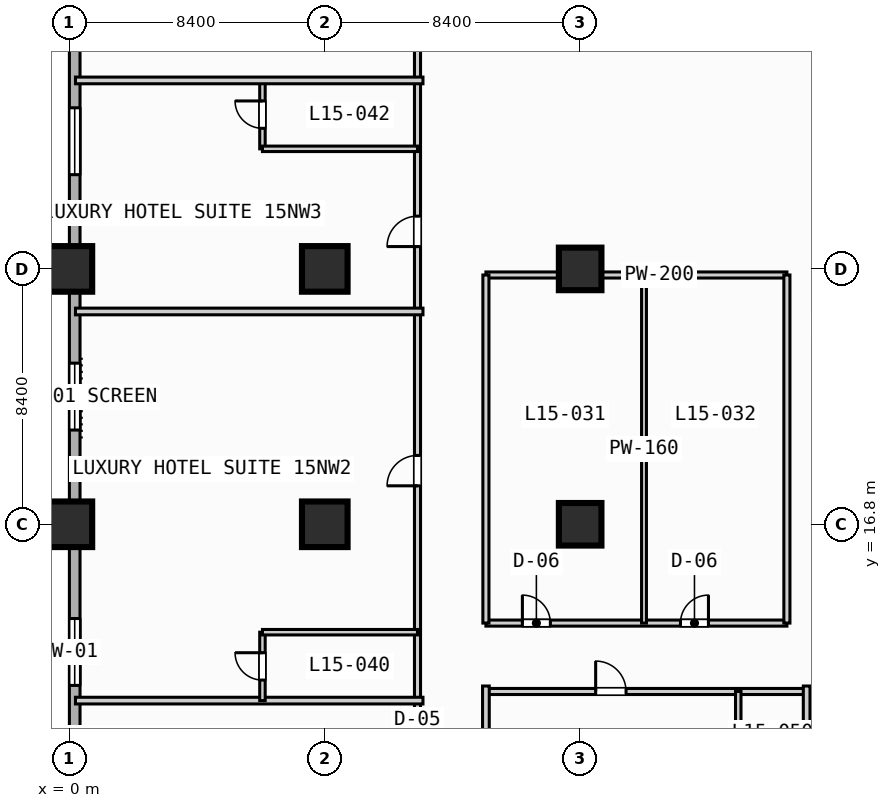
"""IFC4 building model, lengths in metres.
Left out: names, types, materials, properties, quantities, classifications, styles, units other than length and angle.
Written with IfcOpenShell. Run it as: python <this file> out.ifc"""

import sys

from ifc_helpers import new_model, si_unit, direction, frame, frame_2d, origin, origin_2d, place, context, subcontext, project, spatial, rectangle, extrude, element, fill, save


model = new_model("IFC4")
c1 = context("Model", 3, precision=1e-05, world=origin(), true_north=direction((0.0, 1.0)))
c2 = subcontext(c1, "Body", "Model", "MODEL_VIEW")
j1 = project(units=[si_unit("LENGTHUNIT", "METRE"), si_unit("PLANEANGLEUNIT", "RADIAN")], contexts=[c1])
p1 = place(None, origin())
s1 = spatial("IfcSite", under=j1, at=p1, CompositionType="ELEMENT")
p2 = place(p1, origin())
s2 = spatial("IfcBuilding", under=s1, at=p2, CompositionType="ELEMENT")
p3 = place(p2, frame((0.0, 0.0, 66.2)))
s3 = spatial("IfcBuildingStorey", under=s2, at=p3, CompositionType="ELEMENT", Elevation=66.2)
for number, where, z_axis, x_axis in (
    (1, (0.0, 16.8, 0.0), (0.0, 0.0, 1.0), (1.0, 0.0, 0.0)),
    (2, (0.0, 25.2, 0.0), (0.0, 0.0, 1.0), (1.0, 0.0, 0.0)),
    (3, (8.4, 16.8, 0.0), (0.0, 0.0, 1.0), (1.0, 0.0, 0.0)),
    (4, (8.4, 25.2, 0.0), (0.0, 0.0, 1.0), (1.0, 0.0, 0.0)),
):
    element("IfcColumn", number, at=place(p3, frame(where, z_axis=z_axis, x_axis=x_axis)), inside=s3, PredefinedType="COLUMN", context=c2, shape_type="SweptSolid", body=[
        extrude(rectangle(XDim=1.5, YDim=1.5, at=origin_2d()), origin(), (0.0, 0.0, 1.0), 3.8),
    ])
for number, where, z_axis, x_axis in (
    (5, (16.8, 16.8, 0.0), (0.0, 0.0, 1.0), (1.0, 0.0, 0.0)),
    (6, (16.8, 25.2, 0.0), (0.0, 0.0, 1.0), (1.0, 0.0, 0.0)),
):
    element("IfcColumn", number, at=place(p3, frame(where, z_axis=z_axis, x_axis=x_axis)), inside=s3, PredefinedType="COLUMN", context=c2, shape_type="SweptSolid", body=[
        extrude(rectangle(XDim=1.4, YDim=1.4, at=origin_2d()), origin(), (0.0, 0.0, 1.0), 3.8),
    ])
p4 = place(p3, frame((0.175, 3.175, 0.0), z_axis=(0.0, 0.0, 1.0), x_axis=(0.0, 1.0, 0.0)))
e7 = element("IfcWall", 7, at=p4, inside=s3, PredefinedType="STANDARD", context=c2, shape_type="SweptSolid", body=[
    extrude(rectangle(XDim=86.05, YDim=0.35, at=frame_2d((43.025, 0.0))), origin(), (0.0, 0.0, 1.0), 3.55),
])
p5 = place(p4, frame((42.325, 0.0, 0.0)))
e8 = element("IfcOpeningElement", 8, at=p5, cuts=e7, PredefinedType="OPENING", context=c2, shape_type="SweptSolid", body=[
    extrude(rectangle(XDim=1.4, YDim=2.2, at=frame_2d((0.7, 1.1))), frame((0.0, 0.185, 0.0), z_axis=(0.0, -1.0, 0.0), x_axis=(1.0, 0.0, 0.0)), (0.0, 0.0, 1.0), 0.37),
])
p6 = place(p4, frame((8.325, 0.0, 0.85)))
e9 = element("IfcOpeningElement", 9, at=p6, cuts=e7, PredefinedType="OPENING", context=c2, shape_type="SweptSolid", body=[
    extrude(rectangle(XDim=2.2, YDim=1.8, at=frame_2d((1.1, 0.9))), frame((0.0, 0.185, 0.0), z_axis=(0.0, -1.0, 0.0), x_axis=(1.0, 0.0, 0.0)), (0.0, 0.0, 1.0), 0.37),
])
p7 = place(p4, frame((16.725, 0.0, 0.85)))
e10 = element("IfcOpeningElement", 10, at=p7, cuts=e7, PredefinedType="OPENING", context=c2, shape_type="SweptSolid", body=[
    extrude(rectangle(XDim=2.2, YDim=1.8, at=frame_2d((1.1, 0.9))), frame((0.0, 0.185, 0.0), z_axis=(0.0, -1.0, 0.0), x_axis=(1.0, 0.0, 0.0)), (0.0, 0.0, 1.0), 0.37),
])
p8 = place(p4, frame((25.125, 0.0, 0.85)))
e11 = element("IfcOpeningElement", 11, at=p8, cuts=e7, PredefinedType="OPENING", context=c2, shape_type="SweptSolid", body=[
    extrude(rectangle(XDim=2.2, YDim=1.8, at=frame_2d((1.1, 0.9))), frame((0.0, 0.185, 0.0), z_axis=(0.0, -1.0, 0.0), x_axis=(1.0, 0.0, 0.0)), (0.0, 0.0, 1.0), 0.37),
])
p9 = place(p4, frame((33.525, 0.0, 0.85)))
e12 = element("IfcOpeningElement", 12, at=p9, cuts=e7, PredefinedType="OPENING", context=c2, shape_type="SweptSolid", body=[
    extrude(rectangle(XDim=2.2, YDim=1.8, at=frame_2d((1.1, 0.9))), frame((0.0, 0.185, 0.0), z_axis=(0.0, -1.0, 0.0), x_axis=(1.0, 0.0, 0.0)), (0.0, 0.0, 1.0), 0.37),
])
p10 = place(p4, frame((2.375, 0.0, 0.85)))
e13 = element("IfcOpeningElement", 13, at=p10, cuts=e7, PredefinedType="OPENING", context=c2, shape_type="SweptSolid", body=[
    extrude(rectangle(XDim=1.8, YDim=1.8, at=frame_2d((0.9, 0.9))), frame((0.0, 0.185, 0.0), z_axis=(0.0, -1.0, 0.0), x_axis=(1.0, 0.0, 0.0)), (0.0, 0.0, 1.0), 0.37),
])
p11 = place(p4, frame((56.475, 0.0, 0.85)))
e14 = element("IfcOpeningElement", 14, at=p11, cuts=e7, PredefinedType="OPENING", context=c2, shape_type="SweptSolid", body=[
    extrude(rectangle(XDim=1.8, YDim=1.8, at=frame_2d((0.9, 0.9))), frame((0.0, 0.185, 0.0), z_axis=(0.0, -1.0, 0.0), x_axis=(1.0, 0.0, 0.0)), (0.0, 0.0, 1.0), 0.37),
])
p12 = place(p3, frame((13.7, 13.55, 0.0), z_axis=(0.0, 0.0, 1.0), x_axis=(1.0, 0.0, 0.0)))
e15 = element("IfcWall", 15, at=p12, inside=s3, PredefinedType="PARTITIONING", context=c2, shape_type="SweptSolid", body=[
    extrude(rectangle(XDim=9.9, YDim=0.2, at=frame_2d((4.95, 0.0))), origin(), (0.0, 0.0, 1.0), 3.55),
])
p13 = place(p12, frame((1.2, 0.0, 0.0)))
e16 = element("IfcOpeningElement", 16, at=p13, cuts=e15, PredefinedType="OPENING", context=c2, shape_type="SweptSolid", body=[
    extrude(rectangle(XDim=0.92, YDim=2.1, at=frame_2d((0.46, 1.05))), frame((0.0, 0.11, 0.0), z_axis=(0.0, -1.0, 0.0), x_axis=(1.0, 0.0, 0.0)), (0.0, 0.0, 1.0), 0.22),
])
p14 = place(p12, frame((6.4, 0.0, 0.0)))
e17 = element("IfcOpeningElement", 17, at=p14, cuts=e15, PredefinedType="OPENING", context=c2, shape_type="SweptSolid", body=[
    extrude(rectangle(XDim=0.92, YDim=2.1, at=frame_2d((0.46, 1.05))), frame((0.0, 0.11, 0.0), z_axis=(0.0, -1.0, 0.0), x_axis=(1.0, 0.0, 0.0)), (0.0, 0.0, 1.0), 0.22),
])
p15 = place(p3, frame((18.9, 13.55, 0.0), z_axis=(0.0, 0.0, 1.0), x_axis=(0.0, 1.0, 0.0)))
e18 = element("IfcWall", 18, at=p15, inside=s3, PredefinedType="PARTITIONING", context=c2, shape_type="SweptSolid", body=[
    extrude(rectangle(XDim=11.45, YDim=0.16, at=frame_2d((5.725, 0.0))), origin(), (0.0, 0.0, 1.0), 3.55),
])
p16 = place(p3, frame((13.7, 25.0, 0.0), z_axis=(0.0, 0.0, 1.0), x_axis=(1.0, 0.0, 0.0)))
e19 = element("IfcWall", 19, at=p16, inside=s3, PredefinedType="PARTITIONING", context=c2, shape_type="SweptSolid", body=[
    extrude(rectangle(XDim=9.9, YDim=0.2, at=frame_2d((4.95, 0.0))), origin(), (0.0, 0.0, 1.0), 2.8),
])
for number, where, z_axis, x_axis in (
    (20, (13.7, 13.55, 0.0), (0.0, 0.0, 1.0), (0.0, 1.0, 0.0)),
    (21, (23.6, 13.55, 0.0), (0.0, 0.0, 1.0), (0.0, 1.0, 0.0)),
):
    element("IfcWall", number, at=place(p3, frame(where, z_axis=z_axis, x_axis=x_axis)), inside=s3, PredefinedType="PARTITIONING", context=c2, shape_type="SweptSolid", body=[
        extrude(rectangle(XDim=11.45, YDim=0.2, at=frame_2d((5.725, 0.0))), origin(), (0.0, 0.0, 1.0), 3.55),
    ])
p17 = place(p3, frame((11.45, 3.4, 0.0), z_axis=(0.0, 0.0, 1.0), x_axis=(0.0, 1.0, 0.0)))
e22 = element("IfcWall", 22, at=p17, inside=s3, PredefinedType="PARTITIONING", context=c2, shape_type="SweptSolid", body=[
    extrude(rectangle(XDim=60.4, YDim=0.2, at=frame_2d((30.2, 0.0))), origin(), (0.0, 0.0, 1.0), 3.55),
])
p18 = place(p17, frame((4.465, 0.0, 0.0)))
e23 = element("IfcOpeningElement", 23, at=p18, cuts=e22, PredefinedType="OPENING", context=c2, shape_type="SweptSolid", body=[
    extrude(rectangle(XDim=1.0, YDim=2.15, at=frame_2d((0.5, 1.075))), frame((0.0, 0.11, 0.0), z_axis=(0.0, -1.0, 0.0), x_axis=(1.0, 0.0, 0.0)), (0.0, 0.0, 1.0), 0.22),
])
p19 = place(p17, frame((14.665, 0.0, 0.0)))
e24 = element("IfcOpeningElement", 24, at=p19, cuts=e22, PredefinedType="OPENING", context=c2, shape_type="SweptSolid", body=[
    extrude(rectangle(XDim=1.0, YDim=2.15, at=frame_2d((0.5, 1.075))), frame((0.0, 0.11, 0.0), z_axis=(0.0, -1.0, 0.0), x_axis=(1.0, 0.0, 0.0)), (0.0, 0.0, 1.0), 0.22),
])
p20 = place(p17, frame((22.535, 0.0, 0.0)))
e25 = element("IfcOpeningElement", 25, at=p20, cuts=e22, PredefinedType="OPENING", context=c2, shape_type="SweptSolid", body=[
    extrude(rectangle(XDim=1.0, YDim=2.15, at=frame_2d((0.5, 1.075))), frame((0.0, 0.11, 0.0), z_axis=(0.0, -1.0, 0.0), x_axis=(1.0, 0.0, 0.0)), (0.0, 0.0, 1.0), 0.22),
])
p21 = place(p17, frame((31.16, 0.0, 0.0)))
e26 = element("IfcOpeningElement", 26, at=p21, cuts=e22, PredefinedType="OPENING", context=c2, shape_type="SweptSolid", body=[
    extrude(rectangle(XDim=1.0, YDim=2.15, at=frame_2d((0.5, 1.075))), frame((0.0, 0.11, 0.0), z_axis=(0.0, -1.0, 0.0), x_axis=(1.0, 0.0, 0.0)), (0.0, 0.0, 1.0), 0.22),
])
p22 = place(p17, frame((42.36, 0.0, 0.0)))
e27 = element("IfcOpeningElement", 27, at=p22, cuts=e22, PredefinedType="OPENING", context=c2, shape_type="SweptSolid", body=[
    extrude(rectangle(XDim=1.0, YDim=2.15, at=frame_2d((0.5, 1.075))), frame((0.0, 0.11, 0.0), z_axis=(0.0, -1.0, 0.0), x_axis=(1.0, 0.0, 0.0)), (0.0, 0.0, 1.0), 0.22),
])
p23 = place(p17, frame((56.065, 0.0, 0.0)))
e28 = element("IfcOpeningElement", 28, at=p23, cuts=e22, PredefinedType="OPENING", context=c2, shape_type="SweptSolid", body=[
    extrude(rectangle(XDim=1.0, YDim=2.15, at=frame_2d((0.5, 1.075))), frame((0.0, 0.11, 0.0), z_axis=(0.0, -1.0, 0.0), x_axis=(1.0, 0.0, 0.0)), (0.0, 0.0, 1.0), 0.22),
])
p24 = place(p3, frame((0.2, 11.0, 0.0), z_axis=(0.0, 0.0, 1.0), x_axis=(1.0, 0.0, 0.0)))
e29 = element("IfcWall", 29, at=p24, inside=s3, PredefinedType="PARTITIONING", context=c2, shape_type="SweptSolid", body=[
    extrude(rectangle(XDim=11.43, YDim=0.22, at=frame_2d((5.715, 0.0))), origin(), (0.0, 0.0, 1.0), 3.55),
])
p25 = place(p3, frame((6.35, 11.0, 0.0), z_axis=(0.0, 0.0, 1.0), x_axis=(0.0, 1.0, 0.0)))
e30 = element("IfcWall", 30, at=p25, inside=s3, PredefinedType="PLUMBINGWALL", context=c2, shape_type="SweptSolid", body=[
    extrude(rectangle(XDim=2.25, YDim=0.18, at=frame_2d((1.125, 0.0))), origin(), (0.0, 0.0, 1.0), 3.55),
])
p26 = place(p25, frame((0.675, 0.0, 0.0)))
e31 = element("IfcOpeningElement", 31, at=p26, cuts=e30, PredefinedType="OPENING", context=c2, shape_type="SweptSolid", body=[
    extrude(rectangle(XDim=0.9, YDim=2.1, at=frame_2d((0.45, 1.05))), frame((0.0, 0.1, 0.0), z_axis=(0.0, -1.0, 0.0), x_axis=(1.0, 0.0, 0.0)), (0.0, 0.0, 1.0), 0.2),
])
p27 = place(p3, frame((6.35, 13.25, 0.0), z_axis=(0.0, 0.0, 1.0), x_axis=(1.0, 0.0, 0.0)))
e32 = element("IfcWall", 32, at=p27, inside=s3, PredefinedType="PLUMBINGWALL", context=c2, shape_type="SweptSolid", body=[
    extrude(rectangle(XDim=5.1, YDim=0.18, at=frame_2d((2.55, 0.0))), origin(), (0.0, 0.0, 1.0), 3.55),
])
p28 = place(p3, frame((0.2, 23.8, 0.0), z_axis=(0.0, 0.0, 1.0), x_axis=(1.0, 0.0, 0.0)))
e33 = element("IfcWall", 33, at=p28, inside=s3, PredefinedType="PARTITIONING", context=c2, shape_type="SweptSolid", body=[
    extrude(rectangle(XDim=11.43, YDim=0.22, at=frame_2d((5.715, 0.0))), origin(), (0.0, 0.0, 1.0), 3.55),
])
p29 = place(p3, frame((6.35, 29.15, 0.0), z_axis=(0.0, 0.0, 1.0), x_axis=(0.0, 1.0, 0.0)))
e34 = element("IfcWall", 34, at=p29, inside=s3, PredefinedType="PLUMBINGWALL", context=c2, shape_type="SweptSolid", body=[
    extrude(rectangle(XDim=2.25, YDim=0.18, at=frame_2d((1.125, 0.0))), origin(), (0.0, 0.0, 1.0), 3.55),
])
p30 = place(p29, frame((0.675, 0.0, 0.0)))
e35 = element("IfcOpeningElement", 35, at=p30, cuts=e34, PredefinedType="OPENING", context=c2, shape_type="SweptSolid", body=[
    extrude(rectangle(XDim=0.9, YDim=2.1, at=frame_2d((0.45, 1.05))), frame((0.0, 0.1, 0.0), z_axis=(0.0, -1.0, 0.0), x_axis=(1.0, 0.0, 0.0)), (0.0, 0.0, 1.0), 0.2),
])
p31 = place(p3, frame((6.35, 29.15, 0.0), z_axis=(0.0, 0.0, 1.0), x_axis=(1.0, 0.0, 0.0)))
e36 = element("IfcWall", 36, at=p31, inside=s3, PredefinedType="PLUMBINGWALL", context=c2, shape_type="SweptSolid", body=[
    extrude(rectangle(XDim=5.1, YDim=0.18, at=frame_2d((2.55, 0.0))), origin(), (0.0, 0.0, 1.0), 3.55),
])
p32 = place(p3, frame((0.2, 31.4, 0.0), z_axis=(0.0, 0.0, 1.0), x_axis=(1.0, 0.0, 0.0)))
e37 = element("IfcWall", 37, at=p32, inside=s3, PredefinedType="PARTITIONING", context=c2, shape_type="SweptSolid", body=[
    extrude(rectangle(XDim=11.43, YDim=0.22, at=frame_2d((5.715, 0.0))), origin(), (0.0, 0.0, 1.0), 3.55),
])
p33 = place(p3, frame((13.7, 11.3, 0.0), z_axis=(0.0, 0.0, 1.0), x_axis=(1.0, 0.0, 0.0)))
e38 = element("IfcWall", 38, at=p33, inside=s3, PredefinedType="PARTITIONING", context=c2, shape_type="SweptSolid", body=[
    extrude(rectangle(XDim=50.1, YDim=0.2, at=frame_2d((25.05, 0.0))), origin(), (0.0, 0.0, 1.0), 3.55),
])
p34 = place(p33, frame((3.61, 0.0, 0.0)))
e39 = element("IfcOpeningElement", 39, at=p34, cuts=e38, PredefinedType="OPENING", context=c2, shape_type="SweptSolid", body=[
    extrude(rectangle(XDim=1.0, YDim=2.15, at=frame_2d((0.5, 1.075))), frame((0.0, 0.11, 0.0), z_axis=(0.0, -1.0, 0.0), x_axis=(1.0, 0.0, 0.0)), (0.0, 0.0, 1.0), 0.22),
])
p35 = place(p33, frame((16.81, 0.0, 0.0)))
e40 = element("IfcOpeningElement", 40, at=p35, cuts=e38, PredefinedType="OPENING", context=c2, shape_type="SweptSolid", body=[
    extrude(rectangle(XDim=1.0, YDim=2.15, at=frame_2d((0.5, 1.075))), frame((0.0, 0.11, 0.0), z_axis=(0.0, -1.0, 0.0), x_axis=(1.0, 0.0, 0.0)), (0.0, 0.0, 1.0), 0.22),
])
p36 = place(p33, frame((31.935, 0.0, 0.0)))
e41 = element("IfcOpeningElement", 41, at=p36, cuts=e38, PredefinedType="OPENING", context=c2, shape_type="SweptSolid", body=[
    extrude(rectangle(XDim=1.0, YDim=2.15, at=frame_2d((0.5, 1.075))), frame((0.0, 0.11, 0.0), z_axis=(0.0, -1.0, 0.0), x_axis=(1.0, 0.0, 0.0)), (0.0, 0.0, 1.0), 0.22),
])
p37 = place(p33, frame((43.785, 0.0, 0.0)))
e42 = element("IfcOpeningElement", 42, at=p37, cuts=e38, PredefinedType="OPENING", context=c2, shape_type="SweptSolid", body=[
    extrude(rectangle(XDim=1.0, YDim=2.15, at=frame_2d((0.5, 1.075))), frame((0.0, 0.11, 0.0), z_axis=(0.0, -1.0, 0.0), x_axis=(1.0, 0.0, 0.0)), (0.0, 0.0, 1.0), 0.22),
])
p38 = place(p3, frame((13.7, 0.2, 0.0), z_axis=(0.0, 0.0, 1.0), x_axis=(0.0, 1.0, 0.0)))
e43 = element("IfcWall", 43, at=p38, inside=s3, PredefinedType="PARTITIONING", context=c2, shape_type="SweptSolid", body=[
    extrude(rectangle(XDim=11.28, YDim=0.22, at=frame_2d((5.64, 0.0))), origin(), (0.0, 0.0, 1.0), 3.55),
])
p39 = place(p3, frame((22.0, 6.2, 0.0), z_axis=(0.0, 0.0, 1.0), x_axis=(0.0, 1.0, 0.0)))
e44 = element("IfcWall", 44, at=p39, inside=s3, PredefinedType="PLUMBINGWALL", context=c2, shape_type="SweptSolid", body=[
    extrude(rectangle(XDim=5.1, YDim=0.18, at=frame_2d((2.55, 0.0))), origin(), (0.0, 0.0, 1.0), 3.55),
])
p40 = place(p3, frame((24.25, 0.2, 0.0), z_axis=(0.0, 0.0, 1.0), x_axis=(0.0, 1.0, 0.0)))
e45 = element("IfcWall", 45, at=p40, inside=s3, PredefinedType="PARTITIONING", context=c2, shape_type="SweptSolid", body=[
    extrude(rectangle(XDim=11.28, YDim=0.22, at=frame_2d((5.64, 0.0))), origin(), (0.0, 0.0, 1.0), 3.55),
])
p41 = place(p6, origin())
e46 = element("IfcWindow", 46, at=p41, inside=s3, PartitioningType="SINGLE_PANEL", PredefinedType="WINDOW", context=c2, shape_type="SweptSolid", body=[
    extrude(rectangle(XDim=2.2, YDim=1.8, at=frame_2d((1.1, 0.9))), frame((0.0, 0.03, 0.0), z_axis=(0.0, -1.0, 0.0), x_axis=(1.0, 0.0, 0.0)), (0.0, 0.0, 1.0), 0.06),
])
fill(e9, e46)
p42 = place(p7, origin())
e47 = element("IfcWindow", 47, at=p42, inside=s3, PartitioningType="SINGLE_PANEL", PredefinedType="WINDOW", context=c2, shape_type="SweptSolid", body=[
    extrude(rectangle(XDim=2.2, YDim=1.8, at=frame_2d((1.1, 0.9))), frame((0.0, 0.03, 0.0), z_axis=(0.0, -1.0, 0.0), x_axis=(1.0, 0.0, 0.0)), (0.0, 0.0, 1.0), 0.06),
])
fill(e10, e47)
p43 = place(p8, origin())
e48 = element("IfcWindow", 48, at=p43, inside=s3, PartitioningType="SINGLE_PANEL", PredefinedType="WINDOW", context=c2, shape_type="SweptSolid", body=[
    extrude(rectangle(XDim=2.2, YDim=1.8, at=frame_2d((1.1, 0.9))), frame((0.0, 0.03, 0.0), z_axis=(0.0, -1.0, 0.0), x_axis=(1.0, 0.0, 0.0)), (0.0, 0.0, 1.0), 0.06),
])
fill(e11, e48)
p44 = place(p13, origin())
e49 = element("IfcDoor", 49, at=p44, inside=s3, OperationType="SINGLE_SWING_LEFT", PredefinedType="DOOR", context=c2, shape_type="SweptSolid", body=[
    extrude(rectangle(XDim=0.92, YDim=2.1, at=frame_2d((0.46, 1.05))), frame((0.0, 0.025, 0.0), z_axis=(0.0, -1.0, 0.0), x_axis=(1.0, 0.0, 0.0)), (0.0, 0.0, 1.0), 0.05),
])
fill(e16, e49)
p45 = place(p14, origin())
e50 = element("IfcDoor", 50, at=p45, inside=s3, OperationType="SINGLE_SWING_RIGHT", PredefinedType="DOOR", context=c2, shape_type="SweptSolid", body=[
    extrude(rectangle(XDim=0.92, YDim=2.1, at=frame_2d((0.46, 1.05))), frame((0.0, 0.025, 0.0), z_axis=(0.0, -1.0, 0.0), x_axis=(1.0, 0.0, 0.0)), (0.0, 0.0, 1.0), 0.05),
])
fill(e17, e50)
p46 = place(p19, origin())
e51 = element("IfcDoor", 51, at=p46, inside=s3, OperationType="SINGLE_SWING_LEFT", PredefinedType="DOOR", context=c2, shape_type="SweptSolid", body=[
    extrude(rectangle(XDim=1.0, YDim=2.15, at=frame_2d((0.5, 1.075))), frame((0.0, 0.025, 0.0), z_axis=(0.0, -1.0, 0.0), x_axis=(1.0, 0.0, 0.0)), (0.0, 0.0, 1.0), 0.05),
])
fill(e24, e51)
p47 = place(p20, origin())
e52 = element("IfcDoor", 52, at=p47, inside=s3, OperationType="SINGLE_SWING_LEFT", PredefinedType="DOOR", context=c2, shape_type="SweptSolid", body=[
    extrude(rectangle(XDim=1.0, YDim=2.15, at=frame_2d((0.5, 1.075))), frame((0.0, 0.025, 0.0), z_axis=(0.0, -1.0, 0.0), x_axis=(1.0, 0.0, 0.0)), (0.0, 0.0, 1.0), 0.05),
])
fill(e25, e52)
p48 = place(p26, origin())
e53 = element("IfcDoor", 53, at=p48, inside=s3, OperationType="SINGLE_SWING_RIGHT", PredefinedType="DOOR", context=c2, shape_type="SweptSolid", body=[
    extrude(rectangle(XDim=0.9, YDim=2.1, at=frame_2d((0.45, 1.05))), frame((0.0, 0.025, 0.0), z_axis=(0.0, -1.0, 0.0), x_axis=(1.0, 0.0, 0.0)), (0.0, 0.0, 1.0), 0.05),
])
fill(e31, e53)
p49 = place(p30, origin())
e54 = element("IfcDoor", 54, at=p49, inside=s3, OperationType="SINGLE_SWING_RIGHT", PredefinedType="DOOR", context=c2, shape_type="SweptSolid", body=[
    extrude(rectangle(XDim=0.9, YDim=2.1, at=frame_2d((0.45, 1.05))), frame((0.0, 0.025, 0.0), z_axis=(0.0, -1.0, 0.0), x_axis=(1.0, 0.0, 0.0)), (0.0, 0.0, 1.0), 0.05),
])
fill(e35, e54)
p50 = place(p34, origin())
e55 = element("IfcDoor", 55, at=p50, inside=s3, OperationType="SINGLE_SWING_LEFT", PredefinedType="DOOR", context=c2, shape_type="SweptSolid", body=[
    extrude(rectangle(XDim=1.0, YDim=2.15, at=frame_2d((0.5, 1.075))), frame((0.0, 0.025, 0.0), z_axis=(0.0, -1.0, 0.0), x_axis=(1.0, 0.0, 0.0)), (0.0, 0.0, 1.0), 0.05),
])
fill(e39, e55)
save(model, sys.argv[1])
